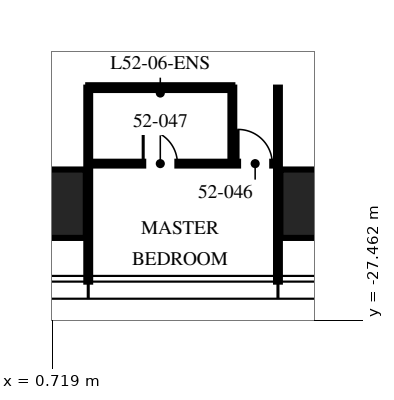
"""IFC4 building model, lengths in metres.
Left out: names, types, materials, properties, quantities, classifications, styles, units other than length and angle.
Written with IfcOpenShell. Run it as: python <this file> out.ifc"""

import sys

from ifc_helpers import new_model, si_unit, direction, frame, frame_2d, origin, origin_2d, place, context, subcontext, project, spatial, rectangle, hollow_rectangle, extrude, element, fill, save


model = new_model("IFC4")
c1 = context("Model", 3, precision=1e-05, world=origin(), true_north=direction((0.0, 1.0)))
c2 = subcontext(c1, "Body", "Model", "MODEL_VIEW")
j1 = project(units=[si_unit("LENGTHUNIT", "METRE"), si_unit("PLANEANGLEUNIT", "RADIAN")], contexts=[c1])
p1 = place(None, origin())
s1 = spatial("IfcSite", under=j1, at=p1, CompositionType="ELEMENT")
p2 = place(p1, origin())
s2 = spatial("IfcBuilding", under=s1, at=p2, CompositionType="ELEMENT")
p3 = place(p2, frame((0.0, 0.0, 210.75)))
s3 = spatial("IfcBuildingStorey", under=s2, at=p3, CompositionType="ELEMENT", Elevation=210.75)
for number, where, z_axis, x_axis in (
    (1, (8.32, -24.4, 0.0), (0.0, 0.0, 1.0), (1.0, 0.0, 0.0)),
    (2, (0.0, -24.4, 0.0), (0.0, 0.0, 1.0), (1.0, 0.0, 0.0)),
):
    element("IfcColumn", number, at=place(p3, frame(where, z_axis=z_axis, x_axis=x_axis)), inside=s3, PredefinedType="COLUMN", context=c2, shape_type="SweptSolid", body=[
        extrude(hollow_rectangle(XDim=3.2, YDim=1.8, WallThickness=0.2, at=origin_2d()), origin(), (0.0, 0.0, 1.0), 3.75),
    ])
for number, where, z_axis, x_axis in (
    (3, (1.664, -21.345, 0.0), (0.0, 0.0, 1.0), (0.0, -1.0, 0.0)),
    (4, (6.656, -21.345, 0.0), (0.0, 0.0, 1.0), (0.0, -1.0, 0.0)),
):
    element("IfcWall", number, at=place(p3, frame(where, z_axis=z_axis, x_axis=x_axis)), inside=s3, PredefinedType="PARTITIONING", context=c2, shape_type="SweptSolid", body=[
        extrude(rectangle(XDim=5.105, YDim=0.1, at=frame_2d((2.552, 0.0))), origin(), (0.0, 0.0, 1.0), 2.91),
    ])
p4 = place(p3, frame((1.664, -23.345, 0.0), z_axis=(0.0, 0.0, 1.0), x_axis=(1.0, 0.0, 0.0)))
e5 = element("IfcWall", 5, at=p4, inside=s3, PredefinedType="PARTITIONING", context=c2, shape_type="SweptSolid", body=[
    extrude(rectangle(XDim=4.992, YDim=0.1, at=frame_2d((2.496, 0.0))), origin(), (0.0, 0.0, 1.0), 2.81),
])
p5 = place(p4, frame((3.942, 0.0, 0.0)))
e6 = element("IfcOpeningElement", 6, at=p5, cuts=e5, PredefinedType="OPENING", context=c2, shape_type="SweptSolid", body=[
    extrude(rectangle(XDim=0.9, YDim=2.1, at=frame_2d((0.45, 1.05))), frame((0.0, 0.06, 0.0), z_axis=(0.0, -1.0, 0.0), x_axis=(1.0, 0.0, 0.0)), (0.0, 0.0, 1.0), 0.12),
])
p6 = place(p4, frame((1.446, 0.0, 0.0)))
e7 = element("IfcOpeningElement", 7, at=p6, cuts=e5, PredefinedType="OPENING", context=c2, shape_type="SweptSolid", body=[
    extrude(rectangle(XDim=0.9, YDim=2.1, at=frame_2d((0.45, 1.05))), frame((0.0, 0.06, 0.0), z_axis=(0.0, -1.0, 0.0), x_axis=(1.0, 0.0, 0.0)), (0.0, 0.0, 1.0), 0.12),
])
p7 = place(p3, frame((5.456, -21.345, 0.0), z_axis=(0.0, 0.0, 1.0), x_axis=(0.0, -1.0, 0.0)))
e8 = element("IfcWall", 8, at=p7, inside=s3, PredefinedType="PARTITIONING", context=c2, shape_type="SweptSolid", body=[
    extrude(rectangle(XDim=2.0, YDim=0.1, at=frame_2d((1.0, 0.0))), origin(), (0.0, 0.0, 1.0), 3.5),
])
p8 = place(p3, frame((1.664, -21.345, 0.0), z_axis=(0.0, 0.0, 1.0), x_axis=(1.0, 0.0, 0.0)))
e9 = element("IfcWall", 9, at=p8, inside=s3, PredefinedType="PARTITIONING", context=c2, shape_type="SweptSolid", body=[
    extrude(rectangle(XDim=3.792, YDim=0.125, at=frame_2d((1.896, 0.0))), origin(), (0.0, 0.0, 1.0), 2.81),
])
p9 = place(p5, origin())
e10 = element("IfcDoor", 10, at=p9, inside=s3, OperationType="SINGLE_SWING_LEFT", PredefinedType="DOOR", context=c2, shape_type="SweptSolid", body=[
    extrude(rectangle(XDim=0.9, YDim=2.1, at=frame_2d((0.45, 1.05))), frame((0.0, 0.025, 0.0), z_axis=(0.0, -1.0, 0.0), x_axis=(1.0, 0.0, 0.0)), (0.0, 0.0, 1.0), 0.05),
])
fill(e6, e10)
p10 = place(p6, origin())
e11 = element("IfcDoor", 11, at=p10, inside=s3, OperationType="SINGLE_SWING_LEFT", PredefinedType="DOOR", context=c2, shape_type="SweptSolid", body=[
    extrude(rectangle(XDim=0.9, YDim=2.1, at=frame_2d((0.45, 1.05))), frame((0.0, 0.025, 0.0), z_axis=(0.0, -1.0, 0.0), x_axis=(1.0, 0.0, 0.0)), (0.0, 0.0, 1.0), 0.05),
])
fill(e7, e11)
save(model, sys.argv[1])
